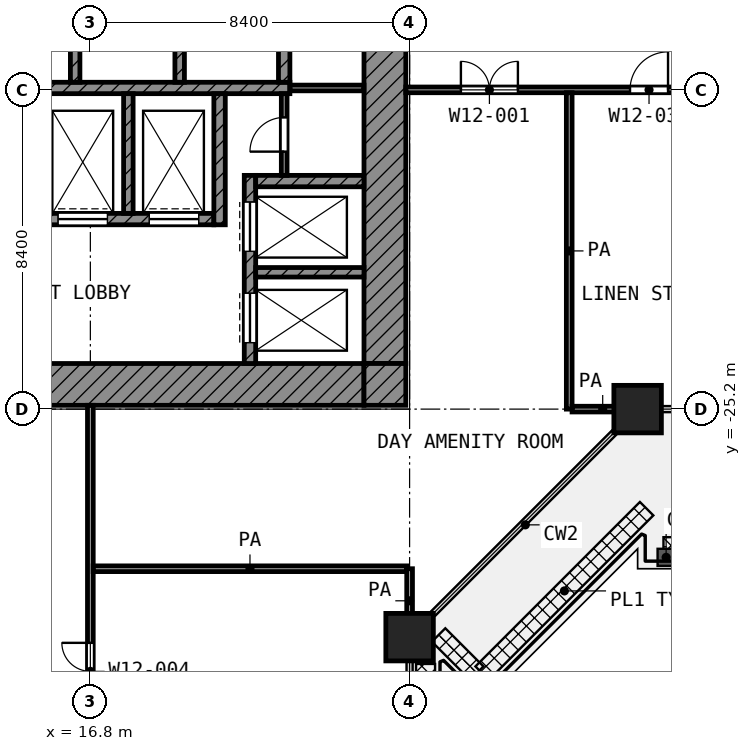
"""IFC4 building model, lengths in metres.
Left out: names, types, materials, properties, quantities, classifications, styles, units other than length and angle.
Written with IfcOpenShell. Run it as: python <this file> out.ifc"""

import sys

from ifc_helpers import new_model, si_unit, direction, frame, frame_2d, origin, origin_2d, place, context, subcontext, project, spatial, rectangle, extrude, element, fill, save


model = new_model("IFC4")
c1 = context("Model", 3, precision=1e-05, world=origin(), true_north=direction((0.0, 1.0)))
c2 = subcontext(c1, "Body", "Model", "MODEL_VIEW")
j1 = project(units=[si_unit("LENGTHUNIT", "METRE"), si_unit("PLANEANGLEUNIT", "RADIAN")], contexts=[c1])
p1 = place(None, origin())
s1 = spatial("IfcSite", under=j1, at=p1, CompositionType="ELEMENT")
p2 = place(p1, origin())
s2 = spatial("IfcBuilding", under=s1, at=p2, CompositionType="ELEMENT")
p3 = place(p2, frame((0.0, 0.0, 56.0)))
s3 = spatial("IfcBuildingStorey", under=s2, at=p3, CompositionType="ELEMENT", Elevation=56.0)
for number, where, z_axis, x_axis in (
    (1, (31.2, -25.2, 0.0), (0.0, 0.0, 1.0), (1.0, 0.0, 0.0)),
    (2, (25.2, -31.2, 0.0), (0.0, 0.0, 1.0), (1.0, 0.0, 0.0)),
):
    element("IfcColumn", number, at=place(p3, frame(where, z_axis=z_axis, x_axis=x_axis)), inside=s3, PredefinedType="COLUMN", context=c2, shape_type="SweptSolid", body=[
        extrude(rectangle(XDim=1.25, YDim=1.25, at=origin_2d()), origin(), (0.0, 0.0, 1.0), 4.2),
    ])
p4 = place(p3, frame((24.55, -24.0, 0.0), z_axis=(0.0, 0.0, 1.0), x_axis=(0.0, 1.0, 0.0)))
e3 = element("IfcWall", 3, at=p4, inside=s3, PredefinedType="SHEAR", context=c2, shape_type="SweptSolid", body=[
    extrude(rectangle(XDim=18.6, YDim=1.1, at=frame_2d((9.3, 0.0))), origin(), (0.0, 0.0, 1.0), 3.9),
])
p5 = place(p4, frame((10.5, 0.0, 0.0)))
e4 = element("IfcOpeningElement", 4, at=p5, cuts=e3, PredefinedType="OPENING", context=c2, shape_type="SweptSolid", body=[
    extrude(rectangle(XDim=1.8, YDim=2.1, at=frame_2d((0.9, 1.05))), frame((0.0, 0.56, 0.0), z_axis=(0.0, -1.0, 0.0), x_axis=(1.0, 0.0, 0.0)), (0.0, 0.0, 1.0), 1.12),
])
p6 = place(p3, frame((5.4, -24.55, 0.0), z_axis=(0.0, 0.0, 1.0), x_axis=(1.0, 0.0, 0.0)))
e5 = element("IfcWall", 5, at=p6, inside=s3, PredefinedType="SHEAR", context=c2, shape_type="SweptSolid", body=[
    extrude(rectangle(XDim=18.6, YDim=1.1, at=frame_2d((9.3, 0.0))), origin(), (0.0, 0.0, 1.0), 3.9),
])
p7 = place(p6, frame((6.3, 0.0, 0.0)))
e6 = element("IfcOpeningElement", 6, at=p7, cuts=e5, PredefinedType="OPENING", context=c2, shape_type="SweptSolid", body=[
    extrude(rectangle(XDim=1.8, YDim=2.1, at=frame_2d((0.9, 1.05))), frame((0.0, 0.56, 0.0), z_axis=(0.0, -1.0, 0.0), x_axis=(1.0, 0.0, 0.0)), (0.0, 0.0, 1.0), 1.12),
])
p8 = place(p3, frame((24.55, -25.1, 0.0), z_axis=(0.0, 0.0, 1.0), x_axis=(0.0, 1.0, 0.0)))
e7 = element("IfcWall", 7, at=p8, inside=s3, PredefinedType="SHEAR", context=c2, shape_type="SweptSolid", body=[
    extrude(rectangle(XDim=1.1, YDim=1.1, at=frame_2d((0.55, 0.0))), origin(), (0.0, 0.0, 1.0), 3.9),
])
p9 = place(p3, frame((5.4, -16.75, 0.0), z_axis=(0.0, 0.0, 1.0), x_axis=(1.0, 0.0, 0.0)))
e8 = element("IfcWall", 8, at=p9, inside=s3, PredefinedType="SHEAR", context=c2, shape_type="SweptSolid", body=[
    extrude(rectangle(XDim=16.65, YDim=0.3, at=frame_2d((8.325, 0.0))), origin(), (0.0, 0.0, 1.0), 3.9),
])
p10 = place(p3, frame((5.4, -20.2, 0.0), z_axis=(0.0, 0.0, 1.0), x_axis=(1.0, 0.0, 0.0)))
e9 = element("IfcWall", 9, at=p10, inside=s3, PredefinedType="SHEAR", context=c2, shape_type="SweptSolid", body=[
    extrude(rectangle(XDim=14.65, YDim=0.3, at=frame_2d((7.325, 0.0))), origin(), (0.0, 0.0, 1.0), 3.9),
])
p11 = place(p10, frame((10.55, 0.0, 0.0)))
e10 = element("IfcOpeningElement", 10, at=p11, cuts=e9, PredefinedType="OPENING", context=c2, shape_type="SweptSolid", body=[
    extrude(rectangle(XDim=1.3, YDim=2.1, at=frame_2d((0.65, 1.05))), frame((0.0, 0.16, 0.0), z_axis=(0.0, -1.0, 0.0), x_axis=(1.0, 0.0, 0.0)), (0.0, 0.0, 1.0), 0.32),
])
p12 = place(p10, frame((12.95, 0.0, 0.0)))
e11 = element("IfcOpeningElement", 11, at=p12, cuts=e9, PredefinedType="OPENING", context=c2, shape_type="SweptSolid", body=[
    extrude(rectangle(XDim=1.3, YDim=2.1, at=frame_2d((0.65, 1.05))), frame((0.0, 0.16, 0.0), z_axis=(0.0, -1.0, 0.0), x_axis=(1.0, 0.0, 0.0)), (0.0, 0.0, 1.0), 0.32),
])
p13 = place(p10, frame((0.55, 0.0, 0.0)))
e12 = element("IfcOpeningElement", 12, at=p13, cuts=e9, PredefinedType="OPENING", context=c2, shape_type="SweptSolid", body=[
    extrude(rectangle(XDim=1.3, YDim=2.1, at=frame_2d((0.65, 1.05))), frame((0.0, 0.16, 0.0), z_axis=(0.0, -1.0, 0.0), x_axis=(1.0, 0.0, 0.0)), (0.0, 0.0, 1.0), 0.32),
])
p14 = place(p10, frame((2.95, 0.0, 0.0)))
e13 = element("IfcOpeningElement", 13, at=p14, cuts=e9, PredefinedType="OPENING", context=c2, shape_type="SweptSolid", body=[
    extrude(rectangle(XDim=1.3, YDim=2.1, at=frame_2d((0.65, 1.05))), frame((0.0, 0.16, 0.0), z_axis=(0.0, -1.0, 0.0), x_axis=(1.0, 0.0, 0.0)), (0.0, 0.0, 1.0), 0.32),
])
p15 = place(p10, frame((7.15, 0.0, 0.0)))
e14 = element("IfcOpeningElement", 14, at=p15, cuts=e9, PredefinedType="OPENING", context=c2, shape_type="SweptSolid", body=[
    extrude(rectangle(XDim=0.9, YDim=2.1, at=frame_2d((0.45, 1.05))), frame((0.0, 0.16, 0.0), z_axis=(0.0, -1.0, 0.0), x_axis=(1.0, 0.0, 0.0)), (0.0, 0.0, 1.0), 0.32),
])
p16 = place(p3, frame((20.2, -20.35, 0.0), z_axis=(0.0, 0.0, 1.0), x_axis=(0.0, 1.0, 0.0)))
e15 = element("IfcWall", 15, at=p16, inside=s3, PredefinedType="SHEAR", context=c2, shape_type="SweptSolid", body=[
    extrude(rectangle(XDim=3.45, YDim=0.3, at=frame_2d((1.725, 0.0))), origin(), (0.0, 0.0, 1.0), 3.9),
])
p17 = place(p3, frame((21.9, -16.6, 0.0), z_axis=(0.0, 0.0, 1.0), x_axis=(0.0, 1.0, 0.0)))
e16 = element("IfcWall", 16, at=p17, inside=s3, PredefinedType="SHEAR", context=c2, shape_type="SweptSolid", body=[
    extrude(rectangle(XDim=2.35, YDim=0.3, at=frame_2d((1.175, 0.0))), origin(), (0.0, 0.0, 1.0), 3.9),
])
p18 = place(p3, frame((21.15, -19.2, 0.0), z_axis=(0.0, 0.0, 1.0), x_axis=(1.0, 0.0, 0.0)))
e17 = element("IfcWall", 17, at=p18, inside=s3, PredefinedType="SHEAR", context=c2, shape_type="SweptSolid", body=[
    extrude(rectangle(XDim=2.85, YDim=0.3, at=frame_2d((1.425, 0.0))), origin(), (0.0, 0.0, 1.0), 3.9),
])
p19 = place(p3, frame((21.0, -24.0, 0.0), z_axis=(0.0, 0.0, 1.0), x_axis=(0.0, 1.0, 0.0)))
e18 = element("IfcWall", 18, at=p19, inside=s3, PredefinedType="SHEAR", context=c2, shape_type="SweptSolid", body=[
    extrude(rectangle(XDim=4.95, YDim=0.3, at=frame_2d((2.475, 0.0))), origin(), (0.0, 0.0, 1.0), 3.9),
])
p20 = place(p19, frame((2.95, 0.0, 0.0)))
e19 = element("IfcOpeningElement", 19, at=p20, cuts=e18, PredefinedType="OPENING", context=c2, shape_type="SweptSolid", body=[
    extrude(rectangle(XDim=1.3, YDim=2.1, at=frame_2d((0.65, 1.05))), frame((0.0, 0.16, 0.0), z_axis=(0.0, -1.0, 0.0), x_axis=(1.0, 0.0, 0.0)), (0.0, 0.0, 1.0), 0.32),
])
p21 = place(p19, frame((0.55, 0.0, 0.0)))
e20 = element("IfcOpeningElement", 20, at=p21, cuts=e18, PredefinedType="OPENING", context=c2, shape_type="SweptSolid", body=[
    extrude(rectangle(XDim=1.3, YDim=2.1, at=frame_2d((0.65, 1.05))), frame((0.0, 0.16, 0.0), z_axis=(0.0, -1.0, 0.0), x_axis=(1.0, 0.0, 0.0)), (0.0, 0.0, 1.0), 0.32),
])
p22 = place(p3, frame((21.15, -21.6, 0.0), z_axis=(0.0, 0.0, 1.0), x_axis=(1.0, 0.0, 0.0)))
e21 = element("IfcWall", 21, at=p22, inside=s3, PredefinedType="SHEAR", context=c2, shape_type="SweptSolid", body=[
    extrude(rectangle(XDim=2.85, YDim=0.25, at=frame_2d((1.425, 0.0))), origin(), (0.0, 0.0, 1.0), 3.9),
])
p23 = place(p3, frame((17.8, -20.05, 0.0), z_axis=(0.0, 0.0, 1.0), x_axis=(0.0, 1.0, 0.0)))
e22 = element("IfcWall", 22, at=p23, inside=s3, PredefinedType="SHEAR", context=c2, shape_type="SweptSolid", body=[
    extrude(rectangle(XDim=3.15, YDim=0.25, at=frame_2d((1.575, 0.0))), origin(), (0.0, 0.0, 1.0), 3.9),
])
for number, where, z_axis, x_axis in (
    (23, (16.4, -16.6, 0.0), (0.0, 0.0, 1.0), (0.0, 1.0, 0.0)),
    (24, (19.15, -16.6, 0.0), (0.0, 0.0, 1.0), (0.0, 1.0, 0.0)),
):
    element("IfcWall", number, at=place(p3, frame(where, z_axis=z_axis, x_axis=x_axis)), inside=s3, PredefinedType="SHEAR", context=c2, shape_type="SweptSolid", body=[
        extrude(rectangle(XDim=2.35, YDim=0.25, at=frame_2d((1.175, 0.0))), origin(), (0.0, 0.0, 1.0), 3.9),
    ])
p24 = place(p3, frame((21.9, -19.05, 0.0), z_axis=(0.0, 0.0, 1.0), x_axis=(0.0, 1.0, 0.0)))
e25 = element("IfcWall", 25, at=p24, inside=s3, PredefinedType="PARTITIONING", context=c2, shape_type="SweptSolid", body=[
    extrude(rectangle(XDim=2.15, YDim=0.15, at=frame_2d((1.075, 0.0))), origin(), (0.0, 0.0, 1.0), 3.9),
])
p25 = place(p24, frame((0.625, 0.0, 0.0)))
e26 = element("IfcOpeningElement", 26, at=p25, cuts=e25, PredefinedType="OPENING", context=c2, shape_type="SweptSolid", body=[
    extrude(rectangle(XDim=0.9, YDim=2.1, at=frame_2d((0.45, 1.05))), frame((0.0, 0.085, 0.0), z_axis=(0.0, -1.0, 0.0), x_axis=(1.0, 0.0, 0.0)), (0.0, 0.0, 1.0), 0.17),
])
p26 = place(p3, frame((22.05, -16.75, 0.0), z_axis=(0.0, 0.0, 1.0), x_axis=(1.0, 0.0, 0.0)))
e27 = element("IfcWall", 27, at=p26, inside=s3, PredefinedType="PARTITIONING", context=c2, shape_type="SweptSolid", body=[
    extrude(rectangle(XDim=1.95, YDim=0.15, at=frame_2d((0.975, 0.0))), origin(), (0.0, 0.0, 1.0), 3.9),
])
p27 = place(p3, frame((16.875, -29.4, 0.0), z_axis=(0.0, 0.0, 1.0), x_axis=(1.0, 0.0, 0.0)))
e28 = element("IfcWall", 28, at=p27, inside=s3, PredefinedType="PARTITIONING", context=c2, shape_type="SweptSolid", body=[
    extrude(rectangle(XDim=8.25, YDim=0.15, at=frame_2d((4.125, 0.0))), origin(), (0.0, 0.0, 1.0), 3.9),
])
p28 = place(p3, frame((29.475, -25.2, 0.0), z_axis=(0.0, 0.0, 1.0), x_axis=(1.0, 0.0, 0.0)))
e29 = element("IfcWall", 29, at=p28, inside=s3, PredefinedType="PARTITIONING", context=c2, shape_type="SweptSolid", body=[
    extrude(rectangle(XDim=1.612, YDim=0.15, at=frame_2d((0.806, 0.0))), origin(), (0.0, 0.0, 1.0), 3.9),
])
p29 = place(p3, frame((25.1, -16.8, 0.0), z_axis=(0.0, 0.0, 1.0), x_axis=(1.0, 0.0, 0.0)))
e30 = element("IfcWall", 30, at=p29, inside=s3, PredefinedType="PARTITIONING", context=c2, shape_type="SweptSolid", body=[
    extrude(rectangle(XDim=54.62, YDim=0.15, at=frame_2d((27.31, 0.0))), origin(), (0.0, 0.0, 1.0), 3.9),
])
p30 = place(p29, frame((1.45, 0.0, 0.0)))
e31 = element("IfcOpeningElement", 31, at=p30, cuts=e30, PredefinedType="OPENING", context=c2, shape_type="SweptSolid", body=[
    extrude(rectangle(XDim=1.5, YDim=2.1, at=frame_2d((0.75, 1.05))), frame((0.0, 0.085, 0.0), z_axis=(0.0, -1.0, 0.0), x_axis=(1.0, 0.0, 0.0)), (0.0, 0.0, 1.0), 0.17),
])
p31 = place(p29, frame((5.9, 0.0, 0.0)))
e32 = element("IfcOpeningElement", 32, at=p31, cuts=e30, PredefinedType="OPENING", context=c2, shape_type="SweptSolid", body=[
    extrude(rectangle(XDim=1.0, YDim=2.1, at=frame_2d((0.5, 1.05))), frame((0.0, 0.085, 0.0), z_axis=(0.0, -1.0, 0.0), x_axis=(1.0, 0.0, 0.0)), (0.0, 0.0, 1.0), 0.17),
])
p32 = place(p29, frame((10.0, 0.0, 0.0)))
e33 = element("IfcOpeningElement", 33, at=p32, cuts=e30, PredefinedType="OPENING", context=c2, shape_type="SweptSolid", body=[
    extrude(rectangle(XDim=1.2, YDim=2.1, at=frame_2d((0.6, 1.05))), frame((0.0, 0.085, 0.0), z_axis=(0.0, -1.0, 0.0), x_axis=(1.0, 0.0, 0.0)), (0.0, 0.0, 1.0), 0.17),
])
p33 = place(p29, frame((15.0, 0.0, 0.0)))
e34 = element("IfcOpeningElement", 34, at=p33, cuts=e30, PredefinedType="OPENING", context=c2, shape_type="SweptSolid", body=[
    extrude(rectangle(XDim=1.2, YDim=2.1, at=frame_2d((0.6, 1.05))), frame((0.0, 0.085, 0.0), z_axis=(0.0, -1.0, 0.0), x_axis=(1.0, 0.0, 0.0)), (0.0, 0.0, 1.0), 0.17),
])
p34 = place(p29, frame((18.1, 0.0, 0.0)))
e35 = element("IfcOpeningElement", 35, at=p34, cuts=e30, PredefinedType="OPENING", context=c2, shape_type="SweptSolid", body=[
    extrude(rectangle(XDim=1.2, YDim=2.1, at=frame_2d((0.6, 1.05))), frame((0.0, 0.085, 0.0), z_axis=(0.0, -1.0, 0.0), x_axis=(1.0, 0.0, 0.0)), (0.0, 0.0, 1.0), 0.17),
])
p35 = place(p29, frame((23.4, 0.0, 0.0)))
e36 = element("IfcOpeningElement", 36, at=p35, cuts=e30, PredefinedType="OPENING", context=c2, shape_type="SweptSolid", body=[
    extrude(rectangle(XDim=1.2, YDim=2.1, at=frame_2d((0.6, 1.05))), frame((0.0, 0.085, 0.0), z_axis=(0.0, -1.0, 0.0), x_axis=(1.0, 0.0, 0.0)), (0.0, 0.0, 1.0), 0.17),
])
p36 = place(p29, frame((21.95, 0.0, 0.0)))
e37 = element("IfcOpeningElement", 37, at=p36, cuts=e30, PredefinedType="OPENING", context=c2, shape_type="SweptSolid", body=[
    extrude(rectangle(XDim=1.1, YDim=2.1, at=frame_2d((0.55, 1.05))), frame((0.0, 0.085, 0.0), z_axis=(0.0, -1.0, 0.0), x_axis=(1.0, 0.0, 0.0)), (0.0, 0.0, 1.0), 0.17),
])
p37 = place(p29, frame((31.8, 0.0, 0.0)))
e38 = element("IfcOpeningElement", 38, at=p37, cuts=e30, PredefinedType="OPENING", context=c2, shape_type="SweptSolid", body=[
    extrude(rectangle(XDim=1.2, YDim=2.1, at=frame_2d((0.6, 1.05))), frame((0.0, 0.085, 0.0), z_axis=(0.0, -1.0, 0.0), x_axis=(1.0, 0.0, 0.0)), (0.0, 0.0, 1.0), 0.17),
])
p38 = place(p29, frame((34.7, 0.0, 0.0)))
e39 = element("IfcOpeningElement", 39, at=p38, cuts=e30, PredefinedType="OPENING", context=c2, shape_type="SweptSolid", body=[
    extrude(rectangle(XDim=1.2, YDim=2.1, at=frame_2d((0.6, 1.05))), frame((0.0, 0.085, 0.0), z_axis=(0.0, -1.0, 0.0), x_axis=(1.0, 0.0, 0.0)), (0.0, 0.0, 1.0), 0.17),
])
p39 = place(p29, frame((43.3, 0.0, 0.0)))
e40 = element("IfcOpeningElement", 40, at=p39, cuts=e30, PredefinedType="OPENING", context=c2, shape_type="SweptSolid", body=[
    extrude(rectangle(XDim=1.2, YDim=2.1, at=frame_2d((0.6, 1.05))), frame((0.0, 0.085, 0.0), z_axis=(0.0, -1.0, 0.0), x_axis=(1.0, 0.0, 0.0)), (0.0, 0.0, 1.0), 0.17),
])
p40 = place(p29, frame((40.5, 0.0, 0.0)))
e41 = element("IfcOpeningElement", 41, at=p40, cuts=e30, PredefinedType="OPENING", context=c2, shape_type="SweptSolid", body=[
    extrude(rectangle(XDim=0.9, YDim=2.1, at=frame_2d((0.45, 1.05))), frame((0.0, 0.085, 0.0), z_axis=(0.0, -1.0, 0.0), x_axis=(1.0, 0.0, 0.0)), (0.0, 0.0, 1.0), 0.17),
])
p41 = place(p29, frame((48.25, 0.0, 0.0)))
e42 = element("IfcOpeningElement", 42, at=p41, cuts=e30, PredefinedType="OPENING", context=c2, shape_type="SweptSolid", body=[
    extrude(rectangle(XDim=1.5, YDim=2.1, at=frame_2d((0.75, 1.05))), frame((0.0, 0.085, 0.0), z_axis=(0.0, -1.0, 0.0), x_axis=(1.0, 0.0, 0.0)), (0.0, 0.0, 1.0), 0.17),
])
p42 = place(p3, frame((16.8, -41.35, 0.0), z_axis=(0.0, 0.0, 1.0), x_axis=(0.0, 1.0, 0.0)))
e43 = element("IfcWall", 43, at=p42, inside=s3, PredefinedType="PARTITIONING", context=c2, shape_type="SweptSolid", body=[
    extrude(rectangle(XDim=16.25, YDim=0.15, at=frame_2d((8.125, 0.0))), origin(), (0.0, 0.0, 1.0), 3.9),
])
p43 = place(p42, frame((8.5, 0.0, 0.0)))
e44 = element("IfcOpeningElement", 44, at=p43, cuts=e43, PredefinedType="OPENING", context=c2, shape_type="SweptSolid", body=[
    extrude(rectangle(XDim=1.5, YDim=2.1, at=frame_2d((0.75, 1.05))), frame((0.0, 0.085, 0.0), z_axis=(0.0, -1.0, 0.0), x_axis=(1.0, 0.0, 0.0)), (0.0, 0.0, 1.0), 0.17),
])
p44 = place(p42, frame((0.35, 0.0, 0.0)))
e45 = element("IfcOpeningElement", 45, at=p44, cuts=e43, PredefinedType="OPENING", context=c2, shape_type="SweptSolid", body=[
    extrude(rectangle(XDim=0.9, YDim=2.1, at=frame_2d((0.45, 1.05))), frame((0.0, 0.085, 0.0), z_axis=(0.0, -1.0, 0.0), x_axis=(1.0, 0.0, 0.0)), (0.0, 0.0, 1.0), 0.17),
])
p45 = place(p3, frame((25.2, -31.087, 0.0), z_axis=(0.0, 0.0, 1.0), x_axis=(0.0, 1.0, 0.0)))
e46 = element("IfcWall", 46, at=p45, inside=s3, PredefinedType="PARTITIONING", context=c2, shape_type="SweptSolid", body=[
    extrude(rectangle(XDim=1.687, YDim=0.15, at=frame_2d((0.844, 0.0))), origin(), (0.0, 0.0, 1.0), 3.9),
])
p46 = place(p3, frame((29.4, -25.2, 0.0), z_axis=(0.0, 0.0, 1.0), x_axis=(0.0, 1.0, 0.0)))
e47 = element("IfcWall", 47, at=p46, inside=s3, PredefinedType="PARTITIONING", context=c2, shape_type="SweptSolid", body=[
    extrude(rectangle(XDim=8.325, YDim=0.15, at=frame_2d((4.163, 0.0))), origin(), (0.0, 0.0, 1.0), 3.9),
])
p47 = place(p20, origin())
e48 = element("IfcDoor", 48, at=p47, inside=s3, OperationType="DOUBLE_DOOR_SLIDING", PredefinedType="DOOR", context=c2, shape_type="SweptSolid", body=[
    extrude(rectangle(XDim=1.3, YDim=2.1, at=frame_2d((0.65, 1.05))), frame((0.0, 0.025, 0.0), z_axis=(0.0, -1.0, 0.0), x_axis=(1.0, 0.0, 0.0)), (0.0, 0.0, 1.0), 0.05),
])
fill(e19, e48)
p48 = place(p21, origin())
e49 = element("IfcDoor", 49, at=p48, inside=s3, OperationType="DOUBLE_DOOR_SLIDING", PredefinedType="DOOR", context=c2, shape_type="SweptSolid", body=[
    extrude(rectangle(XDim=1.3, YDim=2.1, at=frame_2d((0.65, 1.05))), frame((0.0, 0.025, 0.0), z_axis=(0.0, -1.0, 0.0), x_axis=(1.0, 0.0, 0.0)), (0.0, 0.0, 1.0), 0.05),
])
fill(e20, e49)
p49 = place(p11, origin())
e50 = element("IfcDoor", 50, at=p49, inside=s3, OperationType="DOUBLE_DOOR_SLIDING", PredefinedType="DOOR", context=c2, shape_type="SweptSolid", body=[
    extrude(rectangle(XDim=1.3, YDim=2.1, at=frame_2d((0.65, 1.05))), frame((0.0, 0.025, 0.0), z_axis=(0.0, -1.0, 0.0), x_axis=(1.0, 0.0, 0.0)), (0.0, 0.0, 1.0), 0.05),
])
fill(e10, e50)
p50 = place(p12, origin())
e51 = element("IfcDoor", 51, at=p50, inside=s3, OperationType="DOUBLE_DOOR_SLIDING", PredefinedType="DOOR", context=c2, shape_type="SweptSolid", body=[
    extrude(rectangle(XDim=1.3, YDim=2.1, at=frame_2d((0.65, 1.05))), frame((0.0, 0.025, 0.0), z_axis=(0.0, -1.0, 0.0), x_axis=(1.0, 0.0, 0.0)), (0.0, 0.0, 1.0), 0.05),
])
fill(e11, e51)
p51 = place(p25, origin())
e52 = element("IfcDoor", 52, at=p51, inside=s3, OperationType="SINGLE_SWING_LEFT", PredefinedType="DOOR", context=c2, shape_type="SweptSolid", body=[
    extrude(rectangle(XDim=0.9, YDim=2.1, at=frame_2d((0.45, 1.05))), frame((0.0, 0.025, 0.0), z_axis=(0.0, -1.0, 0.0), x_axis=(1.0, 0.0, 0.0)), (0.0, 0.0, 1.0), 0.05),
])
fill(e26, e52)
p52 = place(p30, origin())
e53 = element("IfcDoor", 53, at=p52, inside=s3, OperationType="DOUBLE_DOOR_SINGLE_SWING", PredefinedType="DOOR", context=c2, shape_type="SweptSolid", body=[
    extrude(rectangle(XDim=1.5, YDim=2.1, at=frame_2d((0.75, 1.05))), frame((0.0, 0.025, 0.0), z_axis=(0.0, -1.0, 0.0), x_axis=(1.0, 0.0, 0.0)), (0.0, 0.0, 1.0), 0.05),
])
fill(e31, e53)
p53 = place(p31, origin())
e54 = element("IfcDoor", 54, at=p53, inside=s3, OperationType="SINGLE_SWING_RIGHT", PredefinedType="DOOR", context=c2, shape_type="SweptSolid", body=[
    extrude(rectangle(XDim=1.0, YDim=2.1, at=frame_2d((0.5, 1.05))), frame((0.0, 0.025, 0.0), z_axis=(0.0, -1.0, 0.0), x_axis=(1.0, 0.0, 0.0)), (0.0, 0.0, 1.0), 0.05),
])
fill(e32, e54)
p54 = place(p43, origin())
e55 = element("IfcDoor", 55, at=p54, inside=s3, OperationType="DOUBLE_DOOR_SINGLE_SWING", PredefinedType="DOOR", context=c2, shape_type="SweptSolid", body=[
    extrude(rectangle(XDim=1.5, YDim=2.1, at=frame_2d((0.75, 1.05))), frame((0.0, 0.025, 0.0), z_axis=(0.0, -1.0, 0.0), x_axis=(1.0, 0.0, 0.0)), (0.0, 0.0, 1.0), 0.05),
])
fill(e44, e55)
save(model, sys.argv[1])
